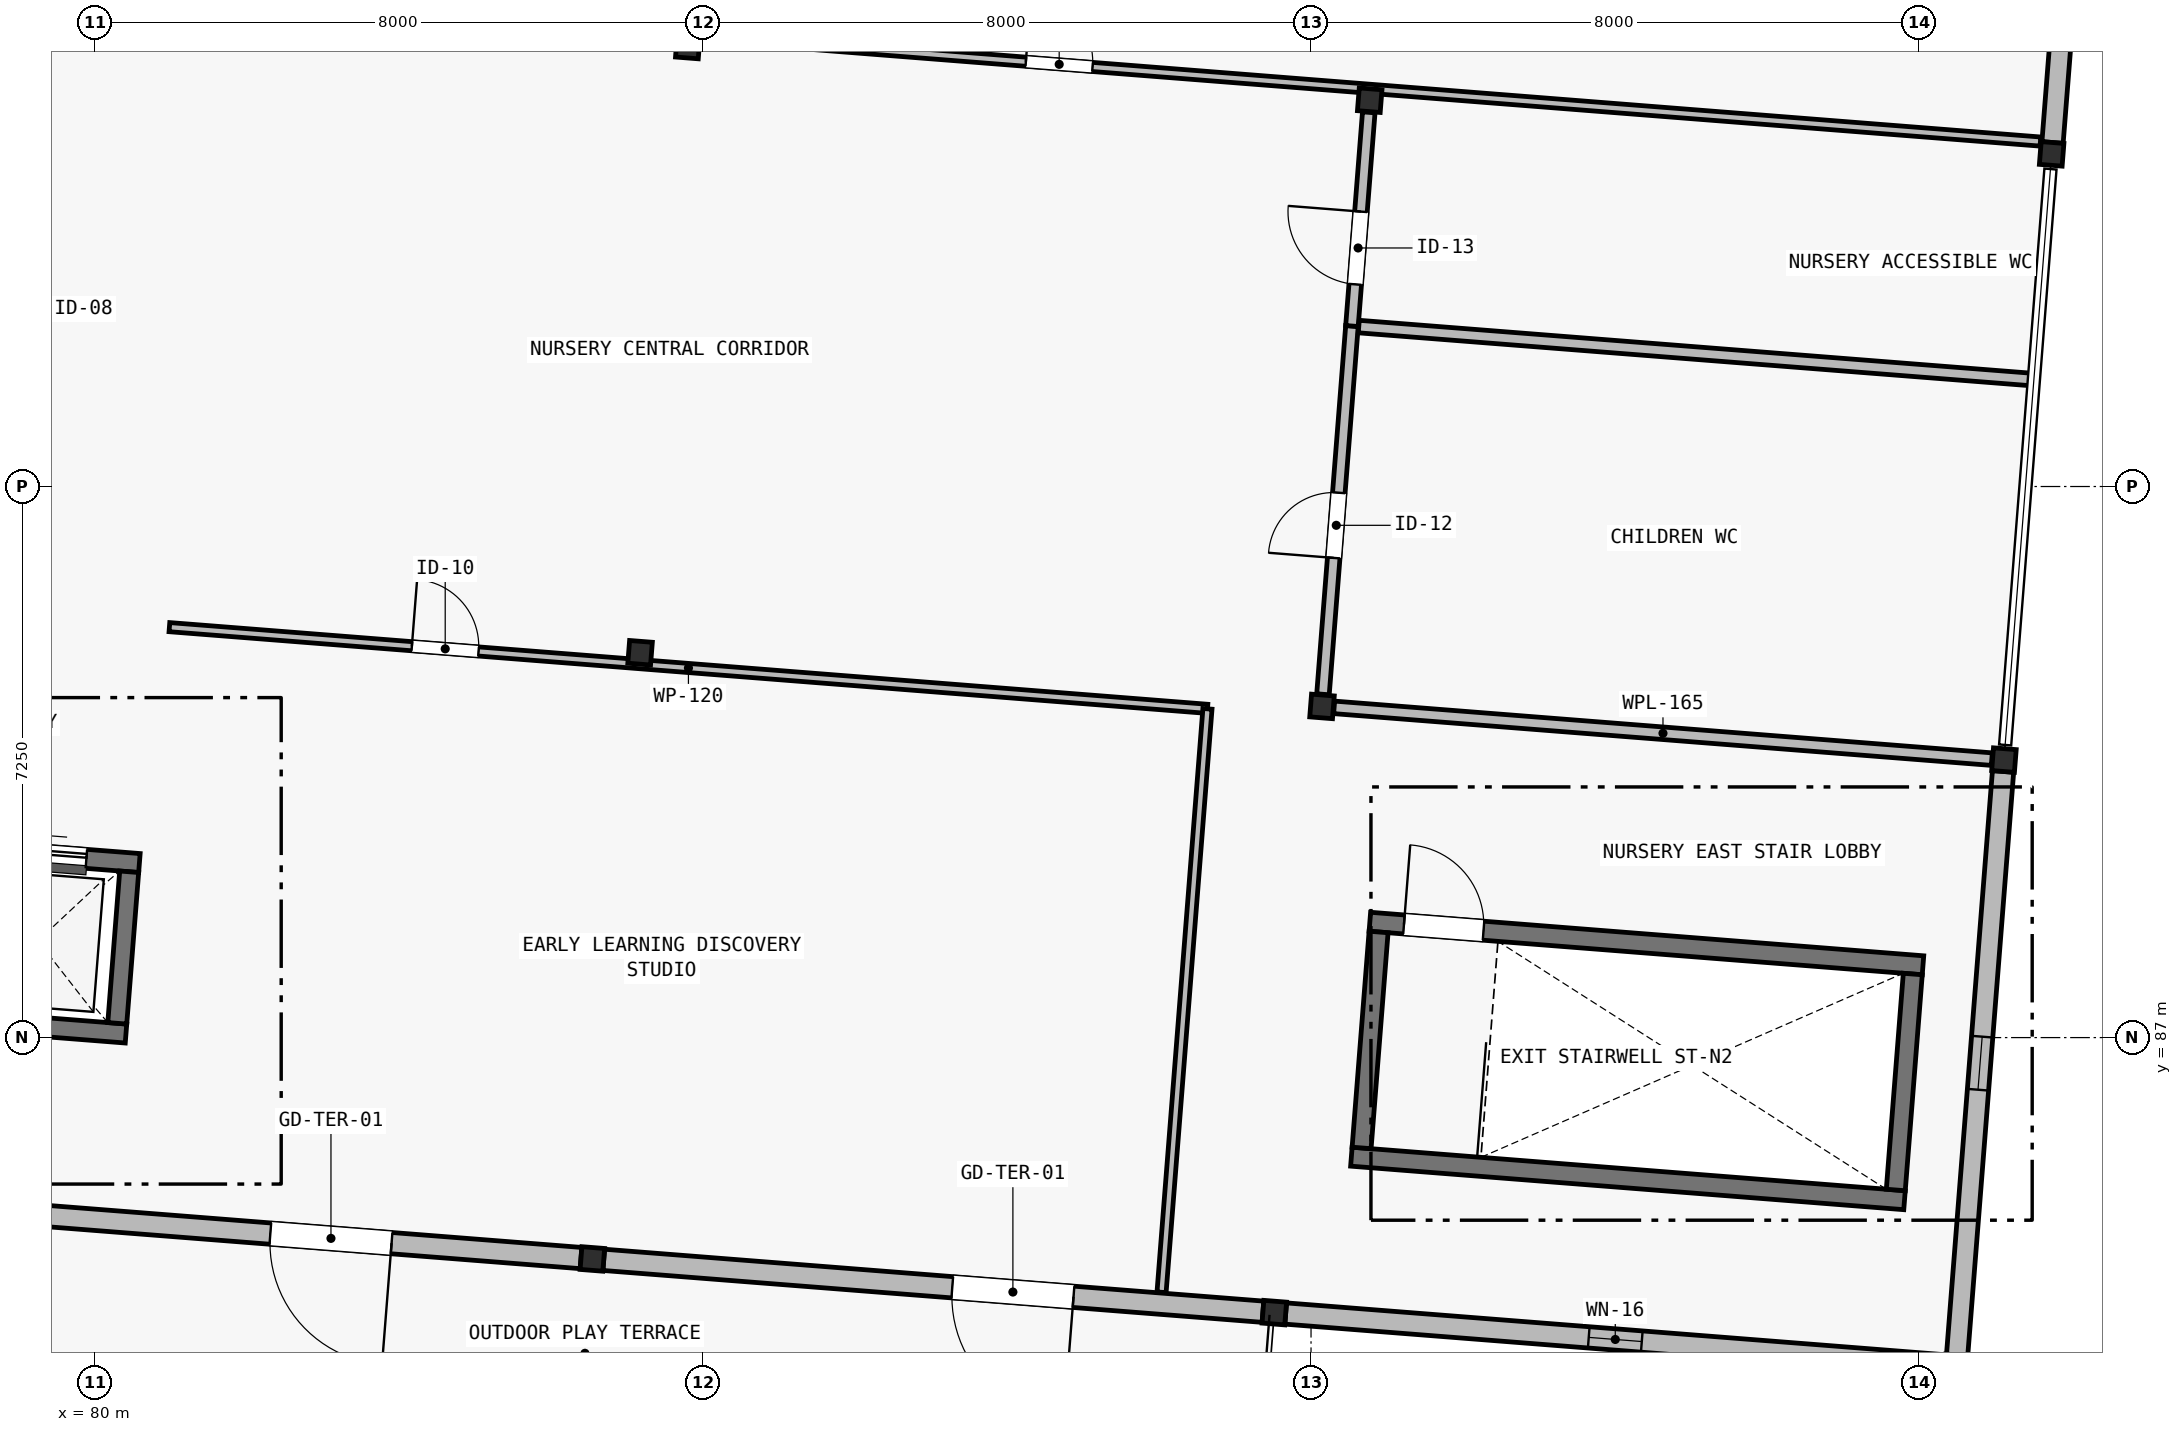
"""IFC4 building model, lengths in metres.
Left out: names, types, materials, properties, quantities, classifications, styles, units other than length and angle.
Written with IfcOpenShell. Run it as: python <this file> out.ifc"""

import sys

from ifc_helpers import new_model, si_unit, direction, frame, frame_2d, origin, origin_2d, place, context, subcontext, project, spatial, rectangle, hollow_rectangle, extrude, element, fill, save


model = new_model("IFC4")
c1 = context("Model", 3, precision=1e-05, world=origin(), true_north=direction((0.0, 1.0)))
c2 = subcontext(c1, "Body", "Model", "MODEL_VIEW")
j1 = project(units=[si_unit("LENGTHUNIT", "METRE"), si_unit("PLANEANGLEUNIT", "RADIAN")], contexts=[c1])
p1 = place(None, origin())
s1 = spatial("IfcSite", under=j1, at=p1, CompositionType="ELEMENT")
p2 = place(p1, origin())
s2 = spatial("IfcBuilding", under=s1, at=p2, CompositionType="ELEMENT")
p3 = place(p2, frame((0.0, 0.0, 8.4)))
s3 = spatial("IfcBuildingStorey", under=s2, at=p3, CompositionType="ELEMENT", Elevation=8.4)
p4 = place(p3, frame((86.544, 84.088, 0.0), z_axis=(0.0, 0.0, 1.0), x_axis=(0.996917333733, -0.078459095728, 0.0)))
e1 = element("IfcColumn", 1, at=p4, inside=s3, PredefinedType="COLUMN", context=c2, shape_type="SweptSolid", body=[
    extrude(hollow_rectangle(XDim=0.3, YDim=0.3, WallThickness=0.016, at=origin_2d()), origin(), (0.0, 0.0, 1.0), 4.87),
])
p5 = place(p3, frame((87.172, 92.063, 0.0), z_axis=(0.0, 0.0, 1.0), x_axis=(0.996917333733, -0.078459095728, 0.0)))
e2 = element("IfcColumn", 2, at=p5, inside=s3, PredefinedType="COLUMN", context=c2, shape_type="SweptSolid", body=[
    extrude(hollow_rectangle(XDim=0.3, YDim=0.3, WallThickness=0.016, at=origin_2d()), origin(), (0.0, 0.0, 1.0), 5.253),
])
p6 = place(p3, frame((87.8, 100.038, 0.0), z_axis=(0.0, 0.0, 1.0), x_axis=(0.996917333733, -0.078459095728, 0.0)))
e3 = element("IfcColumn", 3, at=p6, inside=s3, PredefinedType="COLUMN", context=c2, shape_type="SweptSolid", body=[
    extrude(hollow_rectangle(XDim=0.3, YDim=0.3, WallThickness=0.016, at=origin_2d()), origin(), (0.0, 0.0, 1.0), 5.637),
])
p7 = place(p3, frame((95.517, 83.382, 0.0), z_axis=(0.0, 0.0, 1.0), x_axis=(0.996917333733, -0.078459095728, 0.0)))
e4 = element("IfcColumn", 4, at=p7, inside=s3, PredefinedType="COLUMN", context=c2, shape_type="SweptSolid", body=[
    extrude(hollow_rectangle(XDim=0.3, YDim=0.3, WallThickness=0.016, at=origin_2d()), origin(), (0.0, 0.0, 1.0), 3.57),
])
p8 = place(p3, frame((96.145, 91.357, 0.0), z_axis=(0.0, 0.0, 1.0), x_axis=(0.996917333733, -0.078459095728, 0.0)))
e5 = element("IfcColumn", 5, at=p8, inside=s3, PredefinedType="COLUMN", context=c2, shape_type="SweptSolid", body=[
    extrude(hollow_rectangle(XDim=0.3, YDim=0.3, WallThickness=0.016, at=origin_2d()), origin(), (0.0, 0.0, 1.0), 3.953),
])
p9 = place(p3, frame((96.772, 99.332, 0.0), z_axis=(0.0, 0.0, 1.0), x_axis=(0.996917333733, -0.078459095728, 0.0)))
e6 = element("IfcColumn", 6, at=p9, inside=s3, PredefinedType="COLUMN", context=c2, shape_type="SweptSolid", body=[
    extrude(hollow_rectangle(XDim=0.3, YDim=0.3, WallThickness=0.016, at=origin_2d()), origin(), (0.0, 0.0, 1.0), 4.337),
])
p10 = place(p3, frame((105.117, 90.651, 0.0), z_axis=(0.0, 0.0, 1.0), x_axis=(0.996917333733, -0.078459095728, 0.0)))
e7 = element("IfcColumn", 7, at=p10, inside=s3, PredefinedType="COLUMN", context=c2, shape_type="SweptSolid", body=[
    extrude(hollow_rectangle(XDim=0.3, YDim=0.3, WallThickness=0.016, at=origin_2d()), origin(), (0.0, 0.0, 1.0), 6.053),
])
p11 = place(p3, frame((105.744, 98.626, 0.0), z_axis=(0.0, 0.0, 1.0), x_axis=(0.996917333733, -0.078459095728, 0.0)))
e8 = element("IfcColumn", 8, at=p11, inside=s3, PredefinedType="COLUMN", context=c2, shape_type="SweptSolid", body=[
    extrude(hollow_rectangle(XDim=0.3, YDim=0.3, WallThickness=0.016, at=origin_2d()), origin(), (0.0, 0.0, 1.0), 6.437),
])
p12 = place(p3, frame((96.774, 88.524, 0.0), z_axis=(0.0, 0.0, 1.0), x_axis=(0.996917178022, -0.078461074196, 0.0)))
e9 = element("IfcWall", 9, at=p12, inside=s3, PredefinedType="SHEAR", context=c2, shape_type="SweptSolid", body=[
    extrude(rectangle(XDim=7.3, YDim=0.25, at=frame_2d((3.65, 0.0))), origin(), (0.0, 0.0, 1.0), 3.25),
])
p13 = place(p12, frame((0.45, 0.0, 0.0)))
e10 = element("IfcOpeningElement", 10, at=p13, cuts=e9, PredefinedType="OPENING", context=c2, shape_type="SweptSolid", body=[
    extrude(rectangle(XDim=1.05, YDim=2.15, at=frame_2d((0.525, 1.075))), frame((0.0, 0.14, 0.0), z_axis=(0.0, -1.0, 0.0), x_axis=(1.0, 0.0, 0.0)), (0.0, 0.0, 1.0), 0.28),
])
p14 = place(p3, frame((96.531, 85.433, 0.0), z_axis=(0.0, 0.0, 1.0), x_axis=(0.996917383902, -0.078458458272, 0.0)))
e11 = element("IfcWall", 11, at=p14, inside=s3, PredefinedType="SHEAR", context=c2, shape_type="SweptSolid", body=[
    extrude(rectangle(XDim=7.3, YDim=0.25, at=frame_2d((3.65, 0.0))), origin(), (0.0, 0.0, 1.0), 3.25),
])
p15 = place(p3, frame((96.665, 85.548, 0.0), z_axis=(0.0, 0.0, 1.0), x_axis=(0.078465015546, 0.996916867816, 0.0)))
e12 = element("IfcWall", 12, at=p15, inside=s3, PredefinedType="SHEAR", context=c2, shape_type="SweptSolid", body=[
    extrude(rectangle(XDim=2.85, YDim=0.25, at=frame_2d((1.425, 0.0))), origin(), (0.0, 0.0, 1.0), 3.25),
])
p16 = place(p3, frame((103.694, 84.995, 0.0), z_axis=(0.0, 0.0, 1.0), x_axis=(0.078471716745, 0.996916340357, 0.0)))
e13 = element("IfcWall", 13, at=p16, inside=s3, PredefinedType="SHEAR", context=c2, shape_type="SweptSolid", body=[
    extrude(rectangle(XDim=2.85, YDim=0.25, at=frame_2d((1.425, 0.0))), origin(), (0.0, 0.0, 1.0), 3.25),
])
p17 = place(p3, frame((78.093, 89.492, 0.0), z_axis=(0.0, 0.0, 1.0), x_axis=(0.996920289399, -0.078421531386, 0.0)))
e14 = element("IfcWall", 14, at=p17, inside=s3, PredefinedType="SHEAR", context=c2, shape_type="SweptSolid", body=[
    extrude(rectangle(XDim=2.5, YDim=0.25, at=frame_2d((1.25, 0.0))), origin(), (0.0, 0.0, 1.0), 3.25),
])
p18 = place(p17, frame((0.7, 0.0, 0.0)))
e15 = element("IfcOpeningElement", 15, at=p18, cuts=e14, PredefinedType="OPENING", context=c2, shape_type="SweptSolid", body=[
    extrude(rectangle(XDim=1.1, YDim=2.15, at=frame_2d((0.55, 1.075))), frame((0.0, 0.14, 0.0), z_axis=(0.0, -1.0, 0.0), x_axis=(1.0, 0.0, 0.0)), (0.0, 0.0, 1.0), 0.28),
])
p19 = place(p3, frame((77.916, 87.25, 0.0), z_axis=(0.0, 0.0, 1.0), x_axis=(0.996912649619, -0.07851859035, 0.0)))
e16 = element("IfcWall", 16, at=p19, inside=s3, PredefinedType="SHEAR", context=c2, shape_type="SweptSolid", body=[
    extrude(rectangle(XDim=2.5, YDim=0.25, at=frame_2d((1.25, 0.0))), origin(), (0.0, 0.0, 1.0), 3.25),
])
p20 = place(p3, frame((80.293, 87.188, 0.0), z_axis=(0.0, 0.0, 1.0), x_axis=(0.07848859465, 0.996915011678, 0.0)))
e17 = element("IfcWall", 17, at=p20, inside=s3, PredefinedType="SHEAR", context=c2, shape_type="SweptSolid", body=[
    extrude(rectangle(XDim=2.0, YDim=0.25, at=frame_2d((1.0, 0.0))), origin(), (0.0, 0.0, 1.0), 3.25),
])
p21 = place(p3, frame((86.395, 84.1, 0.0), z_axis=(0.0, 0.0, 1.0), x_axis=(-0.996919433544, 0.078432410537, 0.0)))
e18 = element("IfcWall", 18, at=p21, inside=s3, PredefinedType="SOLIDWALL", context=c2, shape_type="SweptSolid", body=[
    extrude(rectangle(XDim=8.7, YDim=0.28, at=frame_2d((4.35, 0.0))), origin(), (0.0, 0.0, 1.0), 2.58),
])
p22 = place(p21, frame((2.5, 0.0, 0.0)))
e19 = element("IfcOpeningElement", 19, at=p22, cuts=e18, PredefinedType="OPENING", context=c2, shape_type="SweptSolid", body=[
    extrude(rectangle(XDim=1.6, YDim=2.15, at=frame_2d((0.8, 1.075))), frame((0.0, 0.155, 0.0), z_axis=(0.0, -1.0, 0.0), x_axis=(1.0, 0.0, 0.0)), (0.0, 0.0, 1.0), 0.31),
])
p23 = place(p3, frame((95.367, 83.393, 0.0), z_axis=(0.0, 0.0, 1.0), x_axis=(-0.996917066238, 0.078462494502, 0.0)))
e20 = element("IfcWall", 20, at=p23, inside=s3, PredefinedType="SOLIDWALL", context=c2, shape_type="SweptSolid", body=[
    extrude(rectangle(XDim=8.7, YDim=0.28, at=frame_2d((4.35, 0.0))), origin(), (0.0, 0.0, 1.0), 2.58),
])
p24 = place(p23, frame((2.5, 0.0, 0.0)))
e21 = element("IfcOpeningElement", 21, at=p24, cuts=e20, PredefinedType="OPENING", context=c2, shape_type="SweptSolid", body=[
    extrude(rectangle(XDim=1.6, YDim=2.15, at=frame_2d((0.8, 1.075))), frame((0.0, 0.155, 0.0), z_axis=(0.0, -1.0, 0.0), x_axis=(1.0, 0.0, 0.0)), (0.0, 0.0, 1.0), 0.31),
])
p25 = place(p3, frame((104.34, 82.687, 0.0), z_axis=(0.0, 0.0, 1.0), x_axis=(-0.996917238993, 0.078460299505, 0.0)))
e22 = element("IfcWall", 22, at=p25, inside=s3, PredefinedType="SOLIDWALL", context=c2, shape_type="SweptSolid", body=[
    extrude(rectangle(XDim=8.7, YDim=0.28, at=frame_2d((4.35, 0.0))), origin(), (0.0, 0.0, 1.0), 2.58),
])
p26 = place(p25, frame((4.0, 0.0, 0.2)))
e23 = element("IfcOpeningElement", 23, at=p26, cuts=e22, PredefinedType="OPENING", context=c2, shape_type="SweptSolid", body=[
    extrude(rectangle(XDim=0.7, YDim=2.14, at=frame_2d((0.35, 1.07))), frame((0.0, 0.155, 0.0), z_axis=(0.0, -1.0, 0.0), x_axis=(1.0, 0.0, 0.0)), (0.0, 0.0, 1.0), 0.31),
])
p27 = place(p3, frame((105.105, 90.501, 0.0), z_axis=(0.0, 0.0, 1.0), x_axis=(-0.078473620365, -0.996916190513, 0.0)))
e24 = element("IfcWall", 24, at=p27, inside=s3, PredefinedType="SOLIDWALL", context=c2, shape_type="SweptSolid", body=[
    extrude(rectangle(XDim=7.7, YDim=0.28, at=frame_2d((3.85, 0.0))), origin(), (0.0, 0.0, 1.0), 2.58),
])
p28 = place(p27, frame((3.5, 0.0, 0.2)))
e25 = element("IfcOpeningElement", 25, at=p28, cuts=e24, PredefinedType="OPENING", context=c2, shape_type="SweptSolid", body=[
    extrude(rectangle(XDim=0.7, YDim=2.14, at=frame_2d((0.35, 1.07))), frame((0.0, 0.155, 0.0), z_axis=(0.0, -1.0, 0.0), x_axis=(1.0, 0.0, 0.0)), (0.0, 0.0, 1.0), 0.31),
])
p29 = place(p3, frame((106.36, 106.452, 0.0), z_axis=(0.0, 0.0, 1.0), x_axis=(-0.078473620365, -0.996916190513, 0.0)))
e26 = element("IfcWall", 26, at=p29, inside=s3, PredefinedType="SOLIDWALL", context=c2, shape_type="SweptSolid", body=[
    extrude(rectangle(XDim=7.7, YDim=0.28, at=frame_2d((3.85, 0.0))), origin(), (0.0, 0.0, 1.0), 2.58),
])
p30 = place(p29, frame((3.5, 0.0, 0.2)))
e27 = element("IfcOpeningElement", 27, at=p30, cuts=e26, PredefinedType="OPENING", context=c2, shape_type="SweptSolid", body=[
    extrude(rectangle(XDim=0.7, YDim=2.14, at=frame_2d((0.35, 1.07))), frame((0.0, 0.155, 0.0), z_axis=(0.0, -1.0, 0.0), x_axis=(1.0, 0.0, 0.0)), (0.0, 0.0, 1.0), 0.31),
])
p31 = place(p3, frame((80.979, 92.4, 0.0), z_axis=(0.0, 0.0, 1.0), x_axis=(0.996918352409, -0.078446151144, 0.0)))
e28 = element("IfcWall", 28, at=p31, inside=s3, PredefinedType="PARTITIONING", context=c2, shape_type="SweptSolid", body=[
    extrude(rectangle(XDim=13.7, YDim=0.12, at=frame_2d((6.85, 0.0))), origin(), (0.0, 0.0, 1.0), 2.594),
])
p32 = place(p31, frame((3.2, 0.0, 0.0)))
e29 = element("IfcOpeningElement", 29, at=p32, cuts=e28, PredefinedType="OPENING", context=c2, shape_type="SweptSolid", body=[
    extrude(rectangle(XDim=0.88, YDim=2.1, at=frame_2d((0.44, 1.05))), frame((0.0, 0.075, 0.0), z_axis=(0.0, -1.0, 0.0), x_axis=(1.0, 0.0, 0.0)), (0.0, 0.0, 1.0), 0.15),
])
p33 = place(p3, frame((94.033, 83.649, 0.0), z_axis=(0.0, 0.0, 1.0), x_axis=(0.078442108986, 0.996918670473, 0.0)))
e30 = element("IfcWall", 30, at=p33, inside=s3, PredefinedType="PARTITIONING", context=c2, shape_type="SweptSolid", body=[
    extrude(rectangle(XDim=7.7, YDim=0.12, at=frame_2d((3.85, 0.0))), origin(), (0.0, 0.0, 1.0), 2.98),
])
p34 = place(p3, frame((87.812, 100.188, 0.0), z_axis=(0.0, 0.0, 1.0), x_axis=(0.996917614105, -0.078455533188, 0.0)))
e31 = element("IfcWall", 31, at=p34, inside=s3, PredefinedType="PARTITIONING", context=c2, shape_type="SweptSolid", body=[
    extrude(rectangle(XDim=17.84, YDim=0.12, at=frame_2d((8.92, 0.0))), origin(), (0.0, 0.0, 1.0), 2.594),
])
p35 = place(p34, frame((4.45, 0.0, 0.0)))
e32 = element("IfcOpeningElement", 32, at=p35, cuts=e31, PredefinedType="OPENING", context=c2, shape_type="SweptSolid", body=[
    extrude(rectangle(XDim=0.88, YDim=2.1, at=frame_2d((0.44, 1.05))), frame((0.0, 0.075, 0.0), z_axis=(0.0, -1.0, 0.0), x_axis=(1.0, 0.0, 0.0)), (0.0, 0.0, 1.0), 0.15),
])
p36 = place(p3, frame((96.304, 91.344, 0.0), z_axis=(0.0, 0.0, 1.0), x_axis=(0.9969162409, -0.078472980254, 0.0)))
e33 = element("IfcWall", 33, at=p36, inside=s3, PredefinedType="PLUMBINGWALL", context=c2, shape_type="SweptSolid", body=[
    extrude(rectangle(XDim=8.68, YDim=0.165, at=frame_2d((4.34, 0.0))), origin(), (0.0, 0.0, 1.0), 2.594),
])
p37 = place(p3, frame((96.157, 91.516, 0.0), z_axis=(0.0, 0.0, 1.0), x_axis=(0.078463385465, 0.996916996114, 0.0)))
e34 = element("IfcWall", 34, at=p37, inside=s3, PredefinedType="PLUMBINGWALL", context=c2, shape_type="SweptSolid", body=[
    extrude(rectangle(XDim=4.86, YDim=0.165, at=frame_2d((2.43, 0.0))), origin(), (0.0, 0.0, 1.0), 2.594),
])
p38 = place(p37, frame((1.8, 0.0, 0.0)))
e35 = element("IfcOpeningElement", 35, at=p38, cuts=e34, PredefinedType="OPENING", context=c2, shape_type="SweptSolid", body=[
    extrude(rectangle(XDim=0.86, YDim=2.1, at=frame_2d((0.43, 1.05))), frame((0.0, 0.097, 0.0), z_axis=(0.0, -1.0, 0.0), x_axis=(1.0, 0.0, 0.0)), (0.0, 0.0, 1.0), 0.195),
])
p39 = place(p3, frame((96.538, 96.362, 0.0), z_axis=(0.0, 0.0, 1.0), x_axis=(0.078437571766, 0.996919027472, 0.0)))
e36 = element("IfcWall", 36, at=p39, inside=s3, PredefinedType="PLUMBINGWALL", context=c2, shape_type="SweptSolid", body=[
    extrude(rectangle(XDim=2.82, YDim=0.165, at=frame_2d((1.41, 0.0))), origin(), (0.0, 0.0, 1.0), 2.594),
])
p40 = place(p39, frame((0.55, 0.0, 0.0)))
e37 = element("IfcOpeningElement", 37, at=p40, cuts=e36, PredefinedType="OPENING", context=c2, shape_type="SweptSolid", body=[
    extrude(rectangle(XDim=0.96, YDim=2.12, at=frame_2d((0.48, 1.06))), frame((0.0, 0.097, 0.0), z_axis=(0.0, -1.0, 0.0), x_axis=(1.0, 0.0, 0.0)), (0.0, 0.0, 1.0), 0.195),
])
p41 = place(p3, frame((96.628, 96.354, 0.0), z_axis=(0.0, 0.0, 1.0), x_axis=(0.996916420474, -0.078470698917, 0.0)))
e38 = element("IfcWall", 38, at=p41, inside=s3, PredefinedType="PLUMBINGWALL", context=c2, shape_type="SweptSolid", body=[
    extrude(rectangle(XDim=8.87, YDim=0.165, at=frame_2d((4.435, 0.0))), origin(), (0.0, 0.0, 1.0), 2.98),
])
p42 = place(p22, origin())
e39 = element("IfcDoor", 39, at=p42, inside=s3, OperationType="DOUBLE_DOOR_SINGLE_SWING", PredefinedType="DOOR", context=c2, shape_type="SweptSolid", body=[
    extrude(rectangle(XDim=1.6, YDim=2.15, at=frame_2d((0.8, 1.075))), frame((0.0, 0.025, 0.0), z_axis=(0.0, -1.0, 0.0), x_axis=(1.0, 0.0, 0.0)), (0.0, 0.0, 1.0), 0.05),
])
fill(e19, e39)
p43 = place(p24, origin())
e40 = element("IfcDoor", 40, at=p43, inside=s3, OperationType="DOUBLE_DOOR_SINGLE_SWING", PredefinedType="DOOR", context=c2, shape_type="SweptSolid", body=[
    extrude(rectangle(XDim=1.6, YDim=2.15, at=frame_2d((0.8, 1.075))), frame((0.0, 0.025, 0.0), z_axis=(0.0, -1.0, 0.0), x_axis=(1.0, 0.0, 0.0)), (0.0, 0.0, 1.0), 0.05),
])
fill(e21, e40)
p44 = place(p26, origin())
e41 = element("IfcWindow", 41, at=p44, inside=s3, PartitioningType="SINGLE_PANEL", PredefinedType="WINDOW", context=c2, shape_type="SweptSolid", body=[
    extrude(rectangle(XDim=0.7, YDim=2.14, at=frame_2d((0.35, 1.07))), frame((0.0, 0.03, 0.0), z_axis=(0.0, -1.0, 0.0), x_axis=(1.0, 0.0, 0.0)), (0.0, 0.0, 1.0), 0.06),
])
fill(e23, e41)
p45 = place(p28, origin())
e42 = element("IfcWindow", 42, at=p45, inside=s3, PartitioningType="SINGLE_PANEL", PredefinedType="WINDOW", context=c2, shape_type="SweptSolid", body=[
    extrude(rectangle(XDim=0.7, YDim=2.14, at=frame_2d((0.35, 1.07))), frame((0.0, 0.03, 0.0), z_axis=(0.0, -1.0, 0.0), x_axis=(1.0, 0.0, 0.0)), (0.0, 0.0, 1.0), 0.06),
])
fill(e25, e42)
p46 = place(p32, origin())
e43 = element("IfcDoor", 43, at=p46, inside=s3, OperationType="SINGLE_SWING_LEFT", PredefinedType="DOOR", context=c2, shape_type="SweptSolid", body=[
    extrude(rectangle(XDim=0.88, YDim=2.1, at=frame_2d((0.44, 1.05))), frame((0.0, 0.025, 0.0), z_axis=(0.0, -1.0, 0.0), x_axis=(1.0, 0.0, 0.0)), (0.0, 0.0, 1.0), 0.05),
])
fill(e29, e43)
p47 = place(p35, origin())
e44 = element("IfcDoor", 44, at=p47, inside=s3, OperationType="SINGLE_SWING_LEFT", PredefinedType="DOOR", context=c2, shape_type="SweptSolid", body=[
    extrude(rectangle(XDim=0.88, YDim=2.1, at=frame_2d((0.44, 1.05))), frame((0.0, 0.025, 0.0), z_axis=(0.0, -1.0, 0.0), x_axis=(1.0, 0.0, 0.0)), (0.0, 0.0, 1.0), 0.05),
])
fill(e32, e44)
p48 = place(p38, origin())
e45 = element("IfcDoor", 45, at=p48, inside=s3, OperationType="SINGLE_SWING_LEFT", PredefinedType="DOOR", context=c2, shape_type="SweptSolid", body=[
    extrude(rectangle(XDim=0.86, YDim=2.1, at=frame_2d((0.43, 1.05))), frame((0.0, 0.025, 0.0), z_axis=(0.0, -1.0, 0.0), x_axis=(1.0, 0.0, 0.0)), (0.0, 0.0, 1.0), 0.05),
])
fill(e35, e45)
p49 = place(p40, origin())
e46 = element("IfcDoor", 46, at=p49, inside=s3, OperationType="SINGLE_SWING_RIGHT", PredefinedType="DOOR", context=c2, shape_type="SweptSolid", body=[
    extrude(rectangle(XDim=0.96, YDim=2.12, at=frame_2d((0.48, 1.06))), frame((0.0, 0.025, 0.0), z_axis=(0.0, -1.0, 0.0), x_axis=(1.0, 0.0, 0.0)), (0.0, 0.0, 1.0), 0.05),
])
fill(e37, e46)
p50 = place(p13, origin())
e47 = element("IfcDoor", 47, at=p50, inside=s3, OperationType="SINGLE_SWING_LEFT", PredefinedType="DOOR", context=c2, shape_type="SweptSolid", body=[
    extrude(rectangle(XDim=1.05, YDim=2.15, at=frame_2d((0.525, 1.075))), frame((0.0, 0.025, 0.0), z_axis=(0.0, -1.0, 0.0), x_axis=(1.0, 0.0, 0.0)), (0.0, 0.0, 1.0), 0.05),
])
fill(e10, e47)
p51 = place(p18, origin())
e48 = element("IfcDoor", 48, at=p51, inside=s3, OperationType="DOUBLE_DOOR_SLIDING", PredefinedType="DOOR", context=c2, shape_type="SweptSolid", body=[
    extrude(rectangle(XDim=1.1, YDim=2.15, at=frame_2d((0.55, 1.075))), frame((0.0, 0.025, 0.0), z_axis=(0.0, -1.0, 0.0), x_axis=(1.0, 0.0, 0.0)), (0.0, 0.0, 1.0), 0.05),
])
fill(e15, e48)
save(model, sys.argv[1])
